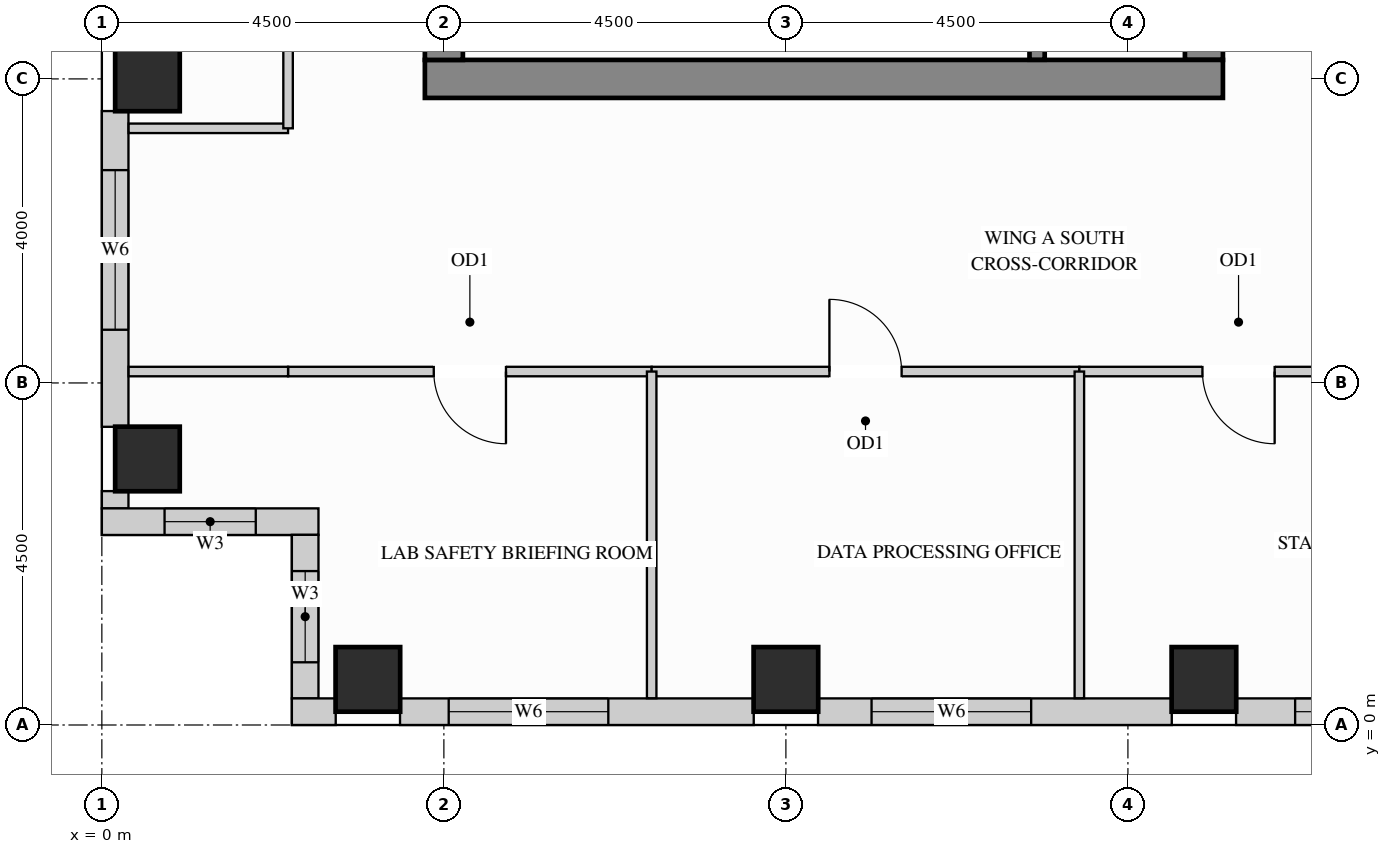
"""IFC4 building model, lengths in metres.
Left out: names, types, materials, properties, quantities, classifications, styles, units other than length and angle.
Written with IfcOpenShell. Run it as: python <this file> out.ifc"""

import sys

from ifc_helpers import new_model, si_unit, direction, frame, frame_2d, origin, origin_2d, place, context, subcontext, project, spatial, rectangle, extrude, source, transform, mapped, element, fill, save


model = new_model("IFC4")
c1 = context("Model", 3, precision=1e-05, world=origin(), true_north=direction((0.0, 1.0)))
c2 = subcontext(c1, "Body", "Model", "MODEL_VIEW")
j1 = project(units=[si_unit("LENGTHUNIT", "METRE"), si_unit("PLANEANGLEUNIT", "RADIAN")], contexts=[c1])
p1 = place(None, origin())
s1 = spatial("IfcSite", under=j1, at=p1, CompositionType="ELEMENT")
p2 = place(p1, origin())
s2 = spatial("IfcBuilding", under=s1, at=p2, CompositionType="ELEMENT")
p3 = place(p2, frame((0.0, 0.0, 252.0)))
s3 = spatial("IfcBuildingStorey", under=s2, at=p3, CompositionType="ELEMENT", Elevation=252.0)
m1 = source(origin(), c2, "Body", "SweptSolid", [
    extrude(rectangle(XDim=0.85, YDim=0.85, at=origin_2d()), origin(), (0.0, 0.0, 1.0), 3.4),
])
for number, where, z_axis, x_axis in (
    (1, (14.5, 0.6, 0.0), (0.0, 0.0, 1.0), (1.0, 0.0, 0.0)),
    (2, (3.5, 0.6, 0.0), (0.0, 0.0, 1.0), (1.0, 0.0, 0.0)),
    (3, (9.0, 0.6, 0.0), (0.0, 0.0, 1.0), (1.0, 0.0, 0.0)),
    (4, (0.6, 3.5, 0.0), (0.0, 0.0, 1.0), (1.0, 0.0, 0.0)),
    (5, (0.6, 8.5, 0.0), (0.0, 0.0, 1.0), (1.0, 0.0, 0.0)),
):
    element("IfcColumn", number, at=place(p3, frame(where, z_axis=z_axis, x_axis=x_axis)), inside=s3, PredefinedType="COLUMN", context=c2, shape_type="MappedRepresentation", body=[
        mapped(m1, transform((0.0, 0.0, 0.0), x_axis=(1.0, 0.0, 0.0), y_axis=(0.0, 1.0, 0.0), z_axis=(0.0, 0.0, 1.0))),
    ])
m2 = source(origin(), c2, "Body", "SweptSolid", [
    extrude(rectangle(XDim=10.07, YDim=0.5, at=frame_2d((5.035, 0.0))), origin(), (0.0, 0.0, 1.0), 3.4),
])
p4 = place(p3, frame((14.5, 8.75, 0.0), z_axis=(0.0, 0.0, 1.0), x_axis=(0.0, 1.0, 0.0)))
e6 = element("IfcWall", 6, at=p4, inside=s3, PredefinedType="SHEAR", context=c2, shape_type="MappedRepresentation", body=[
    mapped(m2, transform((0.0, 0.0, 0.0), x_axis=(1.0, 0.0, 0.0), y_axis=(0.0, 1.0, 0.0), z_axis=(0.0, 0.0, 1.0))),
])
m3 = source(origin(), c2, "Body", "SweptSolid", [
    extrude(rectangle(XDim=10.5, YDim=0.5, at=frame_2d((5.25, 0.0))), origin(), (0.0, 0.0, 1.0), 3.4),
])
p5 = place(p3, frame((4.25, 8.5, 0.0), z_axis=(0.0, 0.0, 1.0), x_axis=(1.0, 0.0, 0.0)))
e7 = element("IfcWall", 7, at=p5, inside=s3, PredefinedType="SHEAR", context=c2, shape_type="MappedRepresentation", body=[
    mapped(m3, transform((0.0, 0.0, 0.0), x_axis=(1.0, 0.0, 0.0), y_axis=(0.0, 1.0, 0.0), z_axis=(0.0, 0.0, 1.0))),
])
m4 = source(origin(), c2, "Body", "SweptSolid", [
    extrude(rectangle(XDim=20.5, YDim=0.5, at=frame_2d((10.25, 0.0))), origin(), (0.0, 0.0, 1.0), 3.4),
])
p6 = place(p3, frame((4.5, 8.75, 0.0), z_axis=(0.0, 0.0, 1.0), x_axis=(0.0, 1.0, 0.0)))
e8 = element("IfcWall", 8, at=p6, inside=s3, PredefinedType="SHEAR", context=c2, shape_type="MappedRepresentation", body=[
    mapped(m4, transform((0.0, 0.0, 0.0), x_axis=(1.0, 0.0, 0.0), y_axis=(0.0, 1.0, 0.0), z_axis=(0.0, 0.0, 1.0))),
])
p7 = place(p3, frame((0.175, 8.077, 0.0), z_axis=(0.0, 0.0, 1.0), x_axis=(0.0, -1.0, 0.0)))
e9 = element("IfcWall", 9, at=p7, inside=s3, PredefinedType="SOLIDWALL", context=c2, shape_type="SweptSolid", body=[
    extrude(rectangle(XDim=4.154, YDim=0.35, at=frame_2d((2.077, 0.0))), origin(), (0.0, 0.0, 1.0), 3.385),
])
p8 = place(p7, frame((0.777, 0.0, 0.78)))
e10 = element("IfcOpeningElement", 10, at=p8, cuts=e9, PredefinedType="OPENING", context=c2, shape_type="SweptSolid", body=[
    extrude(rectangle(XDim=2.1, YDim=2.25, at=frame_2d((1.05, 1.125))), frame((0.0, 0.185, 0.0), z_axis=(0.0, -1.0, 0.0), x_axis=(1.0, 0.0, 0.0)), (0.0, 0.0, 1.0), 0.37),
])
m5 = source(origin(), c2, "Body", "SweptSolid", [
    extrude(rectangle(XDim=0.229, YDim=0.35, at=frame_2d((0.115, 0.0))), origin(), (0.0, 0.0, 1.0), 3.385),
])
p9 = place(p3, frame((0.175, 3.077, 0.0), z_axis=(0.0, 0.0, 1.0), x_axis=(0.0, -1.0, 0.0)))
e11 = element("IfcWall", 11, at=p9, inside=s3, PredefinedType="SOLIDWALL", context=c2, shape_type="MappedRepresentation", body=[
    mapped(m5, transform((0.0, 0.0, 0.0), x_axis=(1.0, 0.0, 0.0), y_axis=(0.0, 1.0, 0.0), z_axis=(0.0, 0.0, 1.0))),
])
p10 = place(p3, frame((0.0, 2.675, 0.0), z_axis=(0.0, 0.0, 1.0), x_axis=(1.0, 0.0, 0.0)))
e12 = element("IfcWall", 12, at=p10, inside=s3, PredefinedType="SOLIDWALL", context=c2, shape_type="SweptSolid", body=[
    extrude(rectangle(XDim=2.85, YDim=0.35, at=frame_2d((1.425, 0.0))), origin(), (0.0, 0.0, 1.0), 3.385),
])
p11 = place(p10, frame((0.825, 0.0, 0.78)))
e13 = element("IfcOpeningElement", 13, at=p11, cuts=e12, PredefinedType="OPENING", context=c2, shape_type="SweptSolid", body=[
    extrude(rectangle(XDim=1.2, YDim=2.25, at=frame_2d((0.6, 1.125))), frame((0.0, 0.185, 0.0), z_axis=(0.0, -1.0, 0.0), x_axis=(1.0, 0.0, 0.0)), (0.0, 0.0, 1.0), 0.37),
])
p12 = place(p3, frame((2.675, 2.502, 0.0), z_axis=(0.0, 0.0, 1.0), x_axis=(0.0, -1.0, 0.0)))
e14 = element("IfcWall", 14, at=p12, inside=s3, PredefinedType="SOLIDWALL", context=c2, shape_type="SweptSolid", body=[
    extrude(rectangle(XDim=2.154, YDim=0.35, at=frame_2d((1.077, 0.0))), origin(), (0.0, 0.0, 1.0), 3.385),
])
p13 = place(p12, frame((0.477, 0.0, 0.78)))
e15 = element("IfcOpeningElement", 15, at=p13, cuts=e14, PredefinedType="OPENING", context=c2, shape_type="SweptSolid", body=[
    extrude(rectangle(XDim=1.2, YDim=2.25, at=frame_2d((0.6, 1.125))), frame((0.0, 0.185, 0.0), z_axis=(0.0, -1.0, 0.0), x_axis=(1.0, 0.0, 0.0)), (0.0, 0.0, 1.0), 0.37),
])
m6 = source(origin(), c2, "Body", "SweptSolid", [
    extrude(rectangle(XDim=0.577, YDim=0.35, at=frame_2d((0.289, 0.0))), origin(), (0.0, 0.0, 1.0), 3.385),
])
p14 = place(p3, frame((2.5, 0.175, 0.0), z_axis=(0.0, 0.0, 1.0), x_axis=(1.0, 0.0, 0.0)))
e16 = element("IfcWall", 16, at=p14, inside=s3, PredefinedType="SOLIDWALL", context=c2, shape_type="MappedRepresentation", body=[
    mapped(m6, transform((0.0, 0.0, 0.0), x_axis=(1.0, 0.0, 0.0), y_axis=(0.0, 1.0, 0.0), z_axis=(0.0, 0.0, 1.0))),
])
p15 = place(p3, frame((3.923, 0.175, 0.0), z_axis=(0.0, 0.0, 1.0), x_axis=(1.0, 0.0, 0.0)))
e17 = element("IfcWall", 17, at=p15, inside=s3, PredefinedType="SOLIDWALL", context=c2, shape_type="SweptSolid", body=[
    extrude(rectangle(XDim=4.654, YDim=0.35, at=frame_2d((2.327, 0.0))), origin(), (0.0, 0.0, 1.0), 3.385),
])
p16 = place(p15, frame((0.64, 0.0, 0.78)))
e18 = element("IfcOpeningElement", 18, at=p16, cuts=e17, PredefinedType="OPENING", context=c2, shape_type="SweptSolid", body=[
    extrude(rectangle(XDim=2.1, YDim=2.25, at=frame_2d((1.05, 1.125))), frame((0.0, 0.185, 0.0), z_axis=(0.0, -1.0, 0.0), x_axis=(1.0, 0.0, 0.0)), (0.0, 0.0, 1.0), 0.37),
])
p17 = place(p3, frame((9.423, 0.175, 0.0), z_axis=(0.0, 0.0, 1.0), x_axis=(1.0, 0.0, 0.0)))
e19 = element("IfcWall", 19, at=p17, inside=s3, PredefinedType="SOLIDWALL", context=c2, shape_type="SweptSolid", body=[
    extrude(rectangle(XDim=4.654, YDim=0.35, at=frame_2d((2.327, 0.0))), origin(), (0.0, 0.0, 1.0), 3.385),
])
p18 = place(p17, frame((0.704, 0.0, 0.78)))
e20 = element("IfcOpeningElement", 20, at=p18, cuts=e19, PredefinedType="OPENING", context=c2, shape_type="SweptSolid", body=[
    extrude(rectangle(XDim=2.1, YDim=2.25, at=frame_2d((1.05, 1.125))), frame((0.0, 0.185, 0.0), z_axis=(0.0, -1.0, 0.0), x_axis=(1.0, 0.0, 0.0)), (0.0, 0.0, 1.0), 0.37),
])
p19 = place(p3, frame((14.923, 0.175, 0.0), z_axis=(0.0, 0.0, 1.0), x_axis=(1.0, 0.0, 0.0)))
e21 = element("IfcWall", 21, at=p19, inside=s3, PredefinedType="SOLIDWALL", context=c2, shape_type="SweptSolid", body=[
    extrude(rectangle(XDim=3.654, YDim=0.35, at=frame_2d((1.827, 0.0))), origin(), (0.0, 0.0, 1.0), 3.385),
])
p20 = place(p19, frame((0.777, 0.0, 0.78)))
e22 = element("IfcOpeningElement", 22, at=p20, cuts=e21, PredefinedType="OPENING", context=c2, shape_type="SweptSolid", body=[
    extrude(rectangle(XDim=2.1, YDim=2.25, at=frame_2d((1.05, 1.125))), frame((0.0, 0.185, 0.0), z_axis=(0.0, -1.0, 0.0), x_axis=(1.0, 0.0, 0.0)), (0.0, 0.0, 1.0), 0.37),
])
m7 = source(origin(), c2, "Body", "SweptSolid", [
    extrude(rectangle(XDim=2.098, YDim=0.125, at=frame_2d((1.049, 0.0))), origin(), (0.0, 0.0, 1.0), 3.385),
])
p21 = place(p3, frame((0.352, 7.85, 0.0), z_axis=(0.0, 0.0, 1.0), x_axis=(1.0, 0.0, 0.0)))
e23 = element("IfcWall", 23, at=p21, inside=s3, PredefinedType="PARTITIONING", context=c2, shape_type="MappedRepresentation", body=[
    mapped(m7, transform((0.0, 0.0, 0.0), x_axis=(1.0, 0.0, 0.0), y_axis=(0.0, 1.0, 0.0), z_axis=(0.0, 0.0, 1.0))),
])
p22 = place(p3, frame((2.45, 4.65, 0.0), z_axis=(0.0, 0.0, 1.0), x_axis=(1.0, 0.0, 0.0)))
e24 = element("IfcWall", 24, at=p22, inside=s3, PredefinedType="PARTITIONING", context=c2, shape_type="SweptSolid", body=[
    extrude(rectangle(XDim=4.784, YDim=0.125, at=frame_2d((2.392, 0.0))), origin(), (0.0, 0.0, 1.0), 2.848),
])
p23 = place(p22, frame((1.917, 0.0, 0.0)))
e25 = element("IfcOpeningElement", 25, at=p23, cuts=e24, PredefinedType="OPENING", context=c2, shape_type="SweptSolid", body=[
    extrude(rectangle(XDim=0.95, YDim=2.15, at=frame_2d((0.475, 1.075))), frame((0.0, 0.073, 0.0), z_axis=(0.0, -1.0, 0.0), x_axis=(1.0, 0.0, 0.0)), (0.0, 0.0, 1.0), 0.145),
])
p24 = place(p3, frame((7.234, 4.65, 0.0), z_axis=(0.0, 0.0, 1.0), x_axis=(1.0, 0.0, 0.0)))
e26 = element("IfcWall", 26, at=p24, inside=s3, PredefinedType="PARTITIONING", context=c2, shape_type="SweptSolid", body=[
    extrude(rectangle(XDim=5.627, YDim=0.125, at=frame_2d((2.813, 0.0))), origin(), (0.0, 0.0, 1.0), 2.848),
])
p25 = place(p24, frame((2.338, 0.0, 0.0)))
e27 = element("IfcOpeningElement", 27, at=p25, cuts=e26, PredefinedType="OPENING", context=c2, shape_type="SweptSolid", body=[
    extrude(rectangle(XDim=0.95, YDim=2.15, at=frame_2d((0.475, 1.075))), frame((0.0, 0.073, 0.0), z_axis=(0.0, -1.0, 0.0), x_axis=(1.0, 0.0, 0.0)), (0.0, 0.0, 1.0), 0.145),
])
p26 = place(p3, frame((12.861, 4.65, 0.0), z_axis=(0.0, 0.0, 1.0), x_axis=(1.0, 0.0, 0.0)))
e28 = element("IfcWall", 28, at=p26, inside=s3, PredefinedType="PARTITIONING", context=c2, shape_type="SweptSolid", body=[
    extrude(rectangle(XDim=4.189, YDim=0.125, at=frame_2d((2.094, 0.0))), origin(), (0.0, 0.0, 1.0), 2.848),
])
p27 = place(p26, frame((1.619, 0.0, 0.0)))
e29 = element("IfcOpeningElement", 29, at=p27, cuts=e28, PredefinedType="OPENING", context=c2, shape_type="SweptSolid", body=[
    extrude(rectangle(XDim=0.95, YDim=2.15, at=frame_2d((0.475, 1.075))), frame((0.0, 0.073, 0.0), z_axis=(0.0, -1.0, 0.0), x_axis=(1.0, 0.0, 0.0)), (0.0, 0.0, 1.0), 0.145),
])
m8 = source(origin(), c2, "Body", "SweptSolid", [
    extrude(rectangle(XDim=2.098, YDim=0.125, at=frame_2d((1.049, 0.0))), origin(), (0.0, 0.0, 1.0), 2.848),
])
p28 = place(p3, frame((0.352, 4.65, 0.0), z_axis=(0.0, 0.0, 1.0), x_axis=(1.0, 0.0, 0.0)))
e30 = element("IfcWall", 30, at=p28, inside=s3, PredefinedType="PARTITIONING", context=c2, shape_type="MappedRepresentation", body=[
    mapped(m8, transform((0.0, 0.0, 0.0), x_axis=(1.0, 0.0, 0.0), y_axis=(0.0, 1.0, 0.0), z_axis=(0.0, 0.0, 1.0))),
])
m9 = source(origin(), c2, "Body", "SweptSolid", [
    extrude(rectangle(XDim=4.298, YDim=0.125, at=frame_2d((2.149, 0.0))), origin(), (0.0, 0.0, 1.0), 3.385),
])
for number, where, z_axis, x_axis in (
    (31, (7.234, 0.352, 0.0), (0.0, 0.0, 1.0), (0.0, 1.0, 0.0)),
    (32, (12.861, 0.352, 0.0), (0.0, 0.0, 1.0), (0.0, 1.0, 0.0)),
):
    element("IfcWall", number, at=place(p3, frame(where, z_axis=z_axis, x_axis=x_axis)), inside=s3, PredefinedType="PARTITIONING", context=c2, shape_type="MappedRepresentation", body=[
        mapped(m9, transform((0.0, 0.0, 0.0), x_axis=(1.0, 0.0, 0.0), y_axis=(0.0, 1.0, 0.0), z_axis=(0.0, 0.0, 1.0))),
    ])
p29 = place(p3, frame((2.45, 7.85, 0.0), z_axis=(0.0, 0.0, 1.0), x_axis=(0.0, 1.0, 0.0)))
e33 = element("IfcWall", 33, at=p29, inside=s3, PredefinedType="PARTITIONING", context=c2, shape_type="SweptSolid", body=[
    extrude(rectangle(XDim=7.25, YDim=0.125, at=frame_2d((3.625, 0.0))), origin(), (0.0, 0.0, 1.0), 3.385),
])
p30 = place(p29, frame((3.15, 0.0, 0.0)))
e34 = element("IfcOpeningElement", 34, at=p30, cuts=e33, PredefinedType="OPENING", context=c2, shape_type="SweptSolid", body=[
    extrude(rectangle(XDim=0.95, YDim=2.15, at=frame_2d((0.475, 1.075))), frame((0.0, 0.073, 0.0), z_axis=(0.0, -1.0, 0.0), x_axis=(1.0, 0.0, 0.0)), (0.0, 0.0, 1.0), 0.145),
])
m10 = source(origin(), c2, "Body", "SweptSolid", [
    extrude(rectangle(XDim=3.803, YDim=0.2, at=frame_2d((1.901, 0.0))), origin(), (0.0, 0.0, 1.0), 3.4),
])
p31 = place(p3, frame((12.305, 8.752, 0.0), z_axis=(0.0, 0.0, 1.0), x_axis=(0.0, 1.0, 0.0)))
e35 = element("IfcWall", 35, at=p31, inside=s3, PredefinedType="SHEAR", context=c2, shape_type="MappedRepresentation", body=[
    mapped(m10, transform((0.0, 0.0, 0.0), x_axis=(1.0, 0.0, 0.0), y_axis=(0.0, 1.0, 0.0), z_axis=(0.0, 0.0, 1.0))),
])
m11 = source(origin(), c2, "Body", "SweptSolid", [
    extrude(rectangle(XDim=0.95, YDim=2.15, at=frame_2d((0.475, 1.075))), frame((0.0, 0.025, 0.0), z_axis=(0.0, -1.0, 0.0), x_axis=(1.0, 0.0, 0.0)), (0.0, 0.0, 1.0), 0.05),
])
p32 = place(p23, origin())
e36 = element("IfcDoor", 36, at=p32, inside=s3, OperationType="SINGLE_SWING_RIGHT", PredefinedType="DOOR", context=c2, shape_type="MappedRepresentation", body=[
    mapped(m11, transform((0.0, 0.0, 0.0), x_axis=(1.0, 0.0, 0.0), y_axis=(0.0, 1.0, 0.0), z_axis=(0.0, 0.0, 1.0))),
])
fill(e25, e36)
p33 = place(p25, origin())
e37 = element("IfcDoor", 37, at=p33, inside=s3, OperationType="SINGLE_SWING_LEFT", PredefinedType="DOOR", context=c2, shape_type="MappedRepresentation", body=[
    mapped(m11, transform((0.0, 0.0, 0.0), x_axis=(1.0, 0.0, 0.0), y_axis=(0.0, 1.0, 0.0), z_axis=(0.0, 0.0, 1.0))),
])
fill(e27, e37)
p34 = place(p27, origin())
e38 = element("IfcDoor", 38, at=p34, inside=s3, OperationType="SINGLE_SWING_RIGHT", PredefinedType="DOOR", context=c2, shape_type="MappedRepresentation", body=[
    mapped(m11, transform((0.0, 0.0, 0.0), x_axis=(1.0, 0.0, 0.0), y_axis=(0.0, 1.0, 0.0), z_axis=(0.0, 0.0, 1.0))),
])
fill(e29, e38)
m12 = source(origin(), c2, "Body", "SweptSolid", [
    extrude(rectangle(XDim=1.2, YDim=2.25, at=frame_2d((0.6, 1.125))), frame((0.0, 0.03, 0.0), z_axis=(0.0, -1.0, 0.0), x_axis=(1.0, 0.0, 0.0)), (0.0, 0.0, 1.0), 0.06),
])
p35 = place(p11, origin())
e39 = element("IfcWindow", 39, at=p35, inside=s3, PartitioningType="SINGLE_PANEL", PredefinedType="WINDOW", context=c2, shape_type="MappedRepresentation", body=[
    mapped(m12, transform((0.0, 0.0, 0.0), x_axis=(1.0, 0.0, 0.0), y_axis=(0.0, 1.0, 0.0), z_axis=(0.0, 0.0, 1.0))),
])
fill(e13, e39)
p36 = place(p13, origin())
e40 = element("IfcWindow", 40, at=p36, inside=s3, PartitioningType="SINGLE_PANEL", PredefinedType="WINDOW", context=c2, shape_type="MappedRepresentation", body=[
    mapped(m12, transform((0.0, 0.0, 0.0), x_axis=(1.0, 0.0, 0.0), y_axis=(0.0, 1.0, 0.0), z_axis=(0.0, 0.0, 1.0))),
])
fill(e15, e40)
m13 = source(origin(), c2, "Body", "SweptSolid", [
    extrude(rectangle(XDim=2.1, YDim=2.25, at=frame_2d((1.05, 1.125))), frame((0.0, 0.03, 0.0), z_axis=(0.0, -1.0, 0.0), x_axis=(1.0, 0.0, 0.0)), (0.0, 0.0, 1.0), 0.06),
])
p37 = place(p8, origin())
e41 = element("IfcWindow", 41, at=p37, inside=s3, PartitioningType="SINGLE_PANEL", PredefinedType="WINDOW", context=c2, shape_type="MappedRepresentation", body=[
    mapped(m13, transform((0.0, 0.0, 0.0), x_axis=(1.0, 0.0, 0.0), y_axis=(0.0, 1.0, 0.0), z_axis=(0.0, 0.0, 1.0))),
])
fill(e10, e41)
p38 = place(p16, origin())
e42 = element("IfcWindow", 42, at=p38, inside=s3, PartitioningType="SINGLE_PANEL", PredefinedType="WINDOW", context=c2, shape_type="MappedRepresentation", body=[
    mapped(m13, transform((0.0, 0.0, 0.0), x_axis=(1.0, 0.0, 0.0), y_axis=(0.0, 1.0, 0.0), z_axis=(0.0, 0.0, 1.0))),
])
fill(e18, e42)
p39 = place(p18, origin())
e43 = element("IfcWindow", 43, at=p39, inside=s3, PartitioningType="SINGLE_PANEL", PredefinedType="WINDOW", context=c2, shape_type="MappedRepresentation", body=[
    mapped(m13, transform((0.0, 0.0, 0.0), x_axis=(1.0, 0.0, 0.0), y_axis=(0.0, 1.0, 0.0), z_axis=(0.0, 0.0, 1.0))),
])
fill(e20, e43)
p40 = place(p20, origin())
e44 = element("IfcWindow", 44, at=p40, inside=s3, PartitioningType="SINGLE_PANEL", PredefinedType="WINDOW", context=c2, shape_type="MappedRepresentation", body=[
    mapped(m13, transform((0.0, 0.0, 0.0), x_axis=(1.0, 0.0, 0.0), y_axis=(0.0, 1.0, 0.0), z_axis=(0.0, 0.0, 1.0))),
])
fill(e22, e44)
save(model, sys.argv[1])
